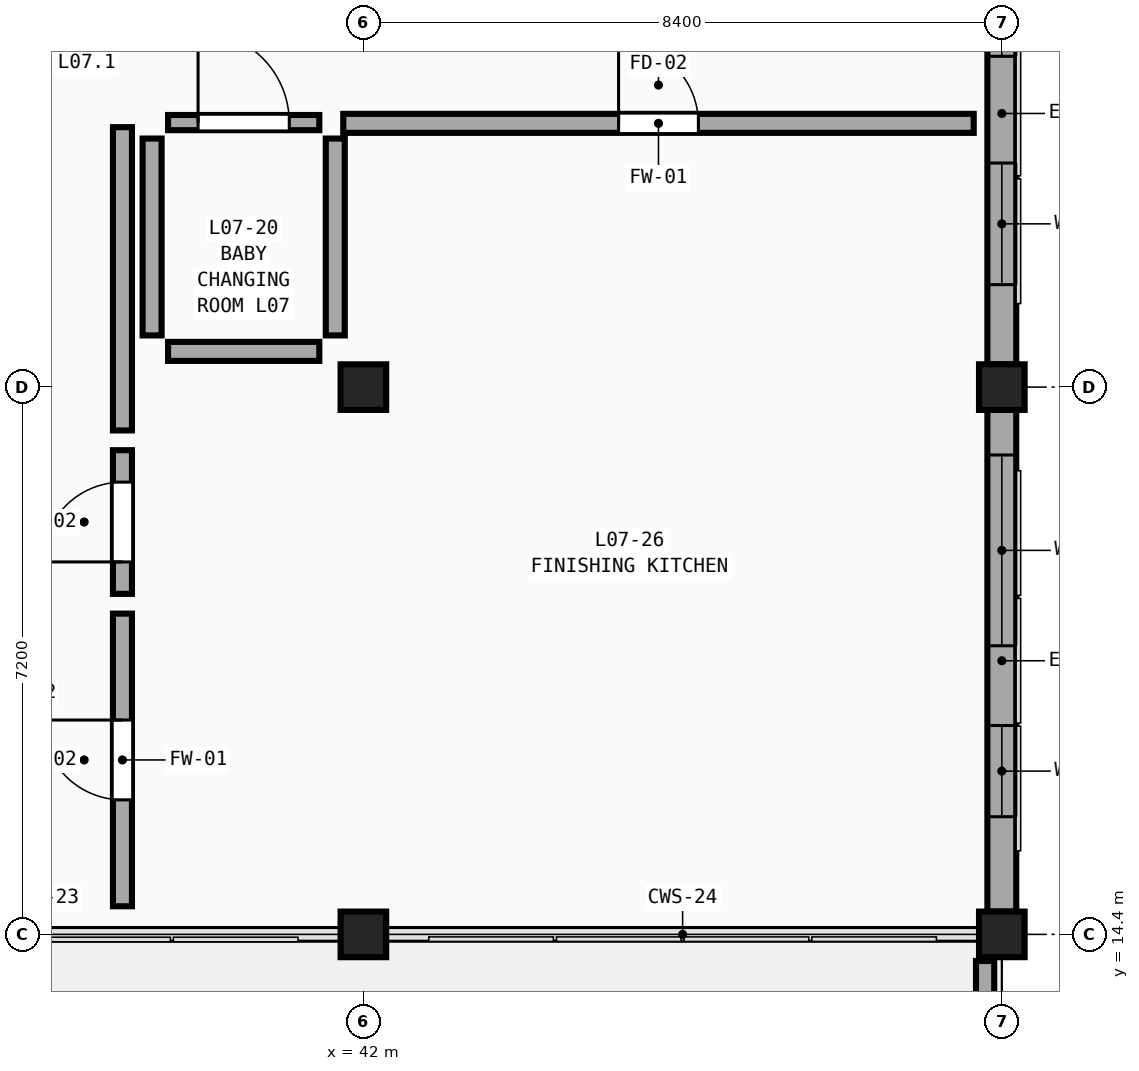
"""IFC4 building model, lengths in metres.
Left out: names, types, materials, properties, quantities, classifications, styles, units other than length and angle.
Written with IfcOpenShell. Run it as: python <this file> out.ifc"""

import sys

from ifc_helpers import new_model, si_unit, direction, frame, frame_2d, origin, origin_2d, place, context, subcontext, project, spatial, rectangle, extrude, element, fill, save


model = new_model("IFC4")
c1 = context("Model", 3, precision=1e-05, world=origin(), true_north=direction((0.0, 1.0)))
c2 = subcontext(c1, "Body", "Model", "MODEL_VIEW")
j1 = project(units=[si_unit("LENGTHUNIT", "METRE"), si_unit("PLANEANGLEUNIT", "RADIAN")], contexts=[c1])
p1 = place(None, origin())
s1 = spatial("IfcSite", under=j1, at=p1, CompositionType="ELEMENT")
p2 = place(p1, origin())
s2 = spatial("IfcBuilding", under=s1, at=p2, CompositionType="ELEMENT")
p3 = place(p2, frame((0.0, 0.0, 32.1)))
s3 = spatial("IfcBuildingStorey", under=s2, at=p3, CompositionType="ELEMENT", Elevation=32.1)
for number, where, z_axis, x_axis in (
    (1, (42.0, 14.4, 0.0), (0.0, 0.0, 1.0), (1.0, 0.0, 0.0)),
    (2, (42.0, 21.6, 0.0), (0.0, 0.0, 1.0), (1.0, 0.0, 0.0)),
    (3, (50.4, 14.4, 0.0), (0.0, 0.0, 1.0), (1.0, 0.0, 0.0)),
    (4, (50.4, 21.6, 0.0), (0.0, 0.0, 1.0), (1.0, 0.0, 0.0)),
):
    element("IfcColumn", number, at=place(p3, frame(where, z_axis=z_axis, x_axis=x_axis)), inside=s3, PredefinedType="COLUMN", context=c2, shape_type="SweptSolid", body=[
        extrude(rectangle(XDim=0.6, YDim=0.6, at=origin_2d()), origin(), (0.0, 0.0, 1.0), 4.5),
    ])
p4 = place(p3, frame((50.4, 21.3, 0.0), z_axis=(0.0, 0.0, 1.0), x_axis=(0.0, -1.0, 0.0)))
e5 = element("IfcWall", 5, at=p4, inside=s3, PredefinedType="SOLIDWALL", context=c2, shape_type="SweptSolid", body=[
    extrude(rectangle(XDim=6.6, YDim=0.38, at=frame_2d((3.3, 0.0))), origin(), (0.0, 0.0, 1.0), 3.69),
])
p5 = place(p4, frame((0.593, 0.0, 0.75)))
e6 = element("IfcOpeningElement", 6, at=p5, cuts=e5, PredefinedType="OPENING", context=c2, shape_type="SweptSolid", body=[
    extrude(rectangle(XDim=2.51, YDim=2.08, at=frame_2d((1.255, 1.04))), frame((0.0, 0.21, 0.0), z_axis=(0.0, -1.0, 0.0), x_axis=(1.0, 0.0, 0.0)), (0.0, 0.0, 1.0), 0.42),
])
p6 = place(p4, frame((4.152, 0.0, 0.75)))
e7 = element("IfcOpeningElement", 7, at=p6, cuts=e5, PredefinedType="OPENING", context=c2, shape_type="SweptSolid", body=[
    extrude(rectangle(XDim=1.2, YDim=2.26, at=frame_2d((0.6, 1.13))), frame((0.0, 0.21, 0.0), z_axis=(0.0, -1.0, 0.0), x_axis=(1.0, 0.0, 0.0)), (0.0, 0.0, 1.0), 0.42),
])
p7 = place(p3, frame((50.4, 28.5, 0.0), z_axis=(0.0, 0.0, 1.0), x_axis=(0.0, -1.0, 0.0)))
e8 = element("IfcWall", 8, at=p7, inside=s3, PredefinedType="SOLIDWALL", context=c2, shape_type="SweptSolid", body=[
    extrude(rectangle(XDim=6.6, YDim=0.38, at=frame_2d((3.3, 0.0))), origin(), (0.0, 0.0, 1.0), 3.69),
])
p8 = place(p7, frame((1.148, 0.0, 0.75)))
e9 = element("IfcOpeningElement", 9, at=p8, cuts=e8, PredefinedType="OPENING", context=c2, shape_type="SweptSolid", body=[
    extrude(rectangle(XDim=1.4, YDim=2.26, at=frame_2d((0.7, 1.13))), frame((0.0, 0.21, 0.0), z_axis=(0.0, -1.0, 0.0), x_axis=(1.0, 0.0, 0.0)), (0.0, 0.0, 1.0), 0.42),
])
p9 = place(p7, frame((3.952, 0.0, 0.75)))
e10 = element("IfcOpeningElement", 10, at=p9, cuts=e8, PredefinedType="OPENING", context=c2, shape_type="SweptSolid", body=[
    extrude(rectangle(XDim=1.6, YDim=2.26, at=frame_2d((0.8, 1.13))), frame((0.0, 0.21, 0.0), z_axis=(0.0, -1.0, 0.0), x_axis=(1.0, 0.0, 0.0)), (0.0, 0.0, 1.0), 0.42),
])
p10 = place(p3, frame((50.18, 14.05, 0.0), z_axis=(0.0, 0.0, 1.0), x_axis=(0.0, -1.0, 0.0)))
e11 = element("IfcWall", 11, at=p10, inside=s3, PredefinedType="PARAPET", context=c2, shape_type="SweptSolid", body=[
    extrude(rectangle(XDim=6.5, YDim=0.24, at=frame_2d((3.25, 0.0))), origin(), (0.0, 0.0, 1.0), 1.15),
])
p11 = place(p3, frame((41.735, 25.07, 0.0), z_axis=(0.0, 0.0, 1.0), x_axis=(1.0, 0.0, 0.0)))
e12 = element("IfcWall", 12, at=p11, inside=s3, PredefinedType="SOLIDWALL", context=c2, shape_type="SweptSolid", body=[
    extrude(rectangle(XDim=8.295, YDim=0.25, at=frame_2d((4.147, 0.0))), origin(), (0.0, 0.0, 1.0), 4.24),
])
p12 = place(p11, frame((3.623, 0.0, 0.0)))
e13 = element("IfcOpeningElement", 13, at=p12, cuts=e12, PredefinedType="OPENING", context=c2, shape_type="SweptSolid", body=[
    extrude(rectangle(XDim=1.05, YDim=2.15, at=frame_2d((0.525, 1.075))), frame((0.0, 0.145, 0.0), z_axis=(0.0, -1.0, 0.0), x_axis=(1.0, 0.0, 0.0)), (0.0, 0.0, 1.0), 0.29),
])
p13 = place(p3, frame((38.83, 21.03, 0.0), z_axis=(0.0, 0.0, 1.0), x_axis=(0.0, 1.0, 0.0)))
e14 = element("IfcWall", 14, at=p13, inside=s3, PredefinedType="SOLIDWALL", context=c2, shape_type="SweptSolid", body=[
    extrude(rectangle(XDim=3.99, YDim=0.25, at=frame_2d((1.995, 0.0))), origin(), (0.0, 0.0, 1.0), 4.24),
])
p14 = place(p3, frame((38.83, 14.77, 0.0), z_axis=(0.0, 0.0, 1.0), x_axis=(0.0, 1.0, 0.0)))
e15 = element("IfcWall", 15, at=p14, inside=s3, PredefinedType="SOLIDWALL", context=c2, shape_type="SweptSolid", body=[
    extrude(rectangle(XDim=3.85, YDim=0.25, at=frame_2d((1.925, 0.0))), origin(), (0.0, 0.0, 1.0), 4.24),
])
p15 = place(p14, frame((1.4, 0.0, 0.0)))
e16 = element("IfcOpeningElement", 16, at=p15, cuts=e15, PredefinedType="OPENING", context=c2, shape_type="SweptSolid", body=[
    extrude(rectangle(XDim=1.05, YDim=2.15, at=frame_2d((0.525, 1.075))), frame((0.0, 0.145, 0.0), z_axis=(0.0, -1.0, 0.0), x_axis=(1.0, 0.0, 0.0)), (0.0, 0.0, 1.0), 0.29),
])
p16 = place(p3, frame((39.43, 25.08, 0.0), z_axis=(0.0, 0.0, 1.0), x_axis=(1.0, 0.0, 0.0)))
e17 = element("IfcWall", 17, at=p16, inside=s3, PredefinedType="PLUMBINGWALL", context=c2, shape_type="SweptSolid", body=[
    extrude(rectangle(XDim=1.99, YDim=0.2, at=frame_2d((0.995, 0.0))), origin(), (0.0, 0.0, 1.0), 4.24),
])
p17 = place(p16, frame((0.395, 0.0, 0.0)))
e18 = element("IfcOpeningElement", 18, at=p17, cuts=e17, PredefinedType="OPENING", context=c2, shape_type="SweptSolid", body=[
    extrude(rectangle(XDim=1.2, YDim=2.05, at=frame_2d((0.6, 1.025))), frame((0.0, 0.12, 0.0), z_axis=(0.0, -1.0, 0.0), x_axis=(1.0, 0.0, 0.0)), (0.0, 0.0, 1.0), 0.24),
])
p18 = place(p3, frame((38.83, 18.88, 0.0), z_axis=(0.0, 0.0, 1.0), x_axis=(0.0, 1.0, 0.0)))
e19 = element("IfcWall", 19, at=p18, inside=s3, PredefinedType="SOLIDWALL", context=c2, shape_type="SweptSolid", body=[
    extrude(rectangle(XDim=1.89, YDim=0.25, at=frame_2d((0.945, 0.0))), origin(), (0.0, 0.0, 1.0), 4.24),
])
p19 = place(p18, frame((0.42, 0.0, 0.0)))
e20 = element("IfcOpeningElement", 20, at=p19, cuts=e19, PredefinedType="OPENING", context=c2, shape_type="SweptSolid", body=[
    extrude(rectangle(XDim=1.05, YDim=2.15, at=frame_2d((0.525, 1.075))), frame((0.0, 0.145, 0.0), z_axis=(0.0, -1.0, 0.0), x_axis=(1.0, 0.0, 0.0)), (0.0, 0.0, 1.0), 0.29),
])
p20 = place(p3, frame((41.63, 22.28, 0.0), z_axis=(0.0, 0.0, 1.0), x_axis=(0.0, 1.0, 0.0)))
e21 = element("IfcWall", 21, at=p20, inside=s3, PredefinedType="SOLIDWALL", context=c2, shape_type="SweptSolid", body=[
    extrude(rectangle(XDim=2.59, YDim=0.25, at=frame_2d((1.295, 0.0))), origin(), (0.0, 0.0, 1.0), 3.79),
])
p21 = place(p3, frame((39.22, 22.28, 0.0), z_axis=(0.0, 0.0, 1.0), x_axis=(0.0, 1.0, 0.0)))
e22 = element("IfcWall", 22, at=p21, inside=s3, PredefinedType="SOLIDWALL", context=c2, shape_type="SweptSolid", body=[
    extrude(rectangle(XDim=2.59, YDim=0.25, at=frame_2d((1.295, 0.0))), origin(), (0.0, 0.0, 1.0), 4.24),
])
p22 = place(p3, frame((39.43, 22.07, 0.0), z_axis=(0.0, 0.0, 1.0), x_axis=(1.0, 0.0, 0.0)))
e23 = element("IfcWall", 23, at=p22, inside=s3, PredefinedType="SOLIDWALL", context=c2, shape_type="SweptSolid", body=[
    extrude(rectangle(XDim=1.99, YDim=0.25, at=frame_2d((0.995, 0.0))), origin(), (0.0, 0.0, 1.0), 3.79),
])
p23 = place(p5, origin())
e24 = element("IfcWindow", 24, at=p23, inside=s3, PartitioningType="TRIPLE_PANEL_VERTICAL", PredefinedType="WINDOW", context=c2, shape_type="SweptSolid", body=[
    extrude(rectangle(XDim=2.51, YDim=2.08, at=frame_2d((1.255, 1.04))), frame((0.0, 0.03, 0.0), z_axis=(0.0, -1.0, 0.0), x_axis=(1.0, 0.0, 0.0)), (0.0, 0.0, 1.0), 0.06),
])
fill(e6, e24)
p24 = place(p6, origin())
e25 = element("IfcWindow", 25, at=p24, inside=s3, PartitioningType="SINGLE_PANEL", PredefinedType="WINDOW", context=c2, shape_type="SweptSolid", body=[
    extrude(rectangle(XDim=1.2, YDim=2.26, at=frame_2d((0.6, 1.13))), frame((0.0, 0.03, 0.0), z_axis=(0.0, -1.0, 0.0), x_axis=(1.0, 0.0, 0.0)), (0.0, 0.0, 1.0), 0.06),
])
fill(e7, e25)
p25 = place(p8, origin())
e26 = element("IfcWindow", 26, at=p25, inside=s3, PartitioningType="DOUBLE_PANEL_VERTICAL", PredefinedType="WINDOW", context=c2, shape_type="SweptSolid", body=[
    extrude(rectangle(XDim=1.4, YDim=2.26, at=frame_2d((0.7, 1.13))), frame((0.0, 0.03, 0.0), z_axis=(0.0, -1.0, 0.0), x_axis=(1.0, 0.0, 0.0)), (0.0, 0.0, 1.0), 0.06),
])
fill(e9, e26)
p26 = place(p9, origin())
e27 = element("IfcWindow", 27, at=p26, inside=s3, PartitioningType="DOUBLE_PANEL_VERTICAL", PredefinedType="WINDOW", context=c2, shape_type="SweptSolid", body=[
    extrude(rectangle(XDim=1.6, YDim=2.26, at=frame_2d((0.8, 1.13))), frame((0.0, 0.03, 0.0), z_axis=(0.0, -1.0, 0.0), x_axis=(1.0, 0.0, 0.0)), (0.0, 0.0, 1.0), 0.06),
])
fill(e10, e27)
p27 = place(p12, origin())
e28 = element("IfcDoor", 28, at=p27, inside=s3, OperationType="SINGLE_SWING_LEFT", PredefinedType="DOOR", context=c2, shape_type="SweptSolid", body=[
    extrude(rectangle(XDim=1.05, YDim=2.15, at=frame_2d((0.525, 1.075))), frame((0.0, 0.025, 0.0), z_axis=(0.0, -1.0, 0.0), x_axis=(1.0, 0.0, 0.0)), (0.0, 0.0, 1.0), 0.05),
])
fill(e13, e28)
p28 = place(p15, origin())
e29 = element("IfcDoor", 29, at=p28, inside=s3, OperationType="SINGLE_SWING_RIGHT", PredefinedType="DOOR", context=c2, shape_type="SweptSolid", body=[
    extrude(rectangle(XDim=1.05, YDim=2.15, at=frame_2d((0.525, 1.075))), frame((0.0, 0.025, 0.0), z_axis=(0.0, -1.0, 0.0), x_axis=(1.0, 0.0, 0.0)), (0.0, 0.0, 1.0), 0.05),
])
fill(e16, e29)
p29 = place(p17, origin())
e30 = element("IfcDoor", 30, at=p29, inside=s3, OperationType="SINGLE_SWING_LEFT", PredefinedType="DOOR", context=c2, shape_type="SweptSolid", body=[
    extrude(rectangle(XDim=1.2, YDim=2.05, at=frame_2d((0.6, 1.025))), frame((0.0, 0.025, 0.0), z_axis=(0.0, -1.0, 0.0), x_axis=(1.0, 0.0, 0.0)), (0.0, 0.0, 1.0), 0.05),
])
fill(e18, e30)
p30 = place(p19, origin())
e31 = element("IfcDoor", 31, at=p30, inside=s3, OperationType="SINGLE_SWING_LEFT", PredefinedType="DOOR", context=c2, shape_type="SweptSolid", body=[
    extrude(rectangle(XDim=1.05, YDim=2.15, at=frame_2d((0.525, 1.075))), frame((0.0, 0.025, 0.0), z_axis=(0.0, -1.0, 0.0), x_axis=(1.0, 0.0, 0.0)), (0.0, 0.0, 1.0), 0.05),
])
fill(e20, e31)
save(model, sys.argv[1])
